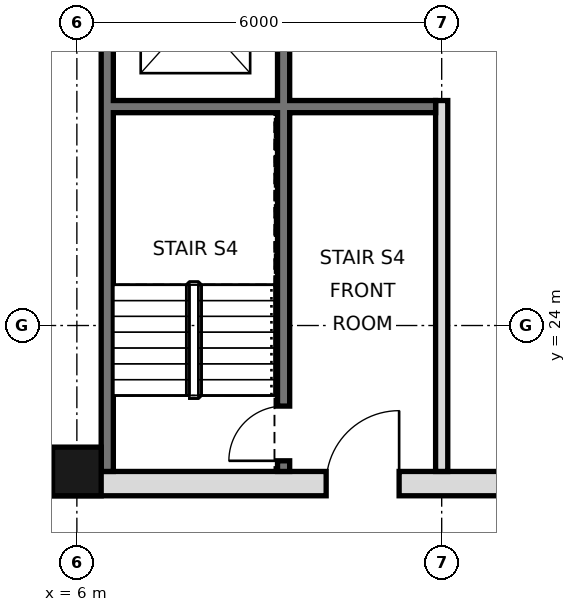
"""IFC4 building model, lengths in metres.
Left out: names, types, materials, properties, quantities, classifications, styles, units other than length and angle.
Written with IfcOpenShell. Run it as: python <this file> out.ifc"""

import sys

from ifc_helpers import new_model, si_unit, direction, frame, frame_2d, origin, origin_2d, place, context, subcontext, project, spatial, rectangle, hollow_rectangle, extrude, element, fill, save


model = new_model("IFC4")
c1 = context("Model", 3, precision=1e-05, world=origin(), true_north=direction((0.0, 1.0)))
c2 = subcontext(c1, "Body", "Model", "MODEL_VIEW")
j1 = project(units=[si_unit("LENGTHUNIT", "METRE"), si_unit("PLANEANGLEUNIT", "RADIAN")], contexts=[c1])
p1 = place(None, origin())
s1 = spatial("IfcSite", under=j1, at=p1, CompositionType="ELEMENT")
p2 = place(p1, origin())
s2 = spatial("IfcBuilding", under=s1, at=p2, CompositionType="ELEMENT")
p3 = place(p2, frame((0.0, 0.0, 161.8)))
s3 = spatial("IfcBuildingStorey", under=s2, at=p3, CompositionType="ELEMENT", Elevation=161.8)
p4 = place(p3, frame((6.0, 21.6, 0.0), z_axis=(0.0, 0.0, 1.0), x_axis=(1.0, 0.0, 0.0)))
e1 = element("IfcColumn", 1, at=p4, inside=s3, PredefinedType="COLUMN", context=c2, shape_type="SweptSolid", body=[
    extrude(hollow_rectangle(XDim=0.8, YDim=0.8, WallThickness=0.045, at=origin_2d()), origin(), (0.0, 0.0, 1.0), 5.4),
])
p5 = place(p3, frame((6.5, 21.6, 0.0), z_axis=(0.0, 0.0, 1.0), x_axis=(0.0, 1.0, 0.0)))
e2 = element("IfcWall", 2, at=p5, inside=s3, PredefinedType="SOLIDWALL", context=c2, shape_type="SweptSolid", body=[
    extrude(rectangle(XDim=23.5, YDim=0.2, at=frame_2d((11.75, 0.0))), origin(), (0.0, 0.0, 1.0), 5.22),
])
p6 = place(p3, frame((5.6, 21.4, 0.0), z_axis=(0.0, 0.0, 1.0), x_axis=(1.0, 0.0, 0.0)))
e3 = element("IfcWall", 3, at=p6, inside=s3, PredefinedType="SOLIDWALL", context=c2, shape_type="SweptSolid", body=[
    extrude(rectangle(XDim=36.8, YDim=0.4, at=frame_2d((18.4, 0.0))), origin(), (0.0, 0.0, 1.0), 5.22),
])
p7 = place(p6, frame((8.5, 0.0, 0.0)))
e4 = element("IfcOpeningElement", 4, at=p7, cuts=e3, PredefinedType="OPENING", context=c2, shape_type="SweptSolid", body=[
    extrude(rectangle(XDim=1.8, YDim=2.1, at=frame_2d((0.9, 1.05))), frame((0.0, 0.21, 0.0), z_axis=(0.0, -1.0, 0.0), x_axis=(1.0, 0.0, 0.0)), (0.0, 0.0, 1.0), 0.42),
])
p8 = place(p6, frame((17.5, 0.0, 0.0)))
e5 = element("IfcOpeningElement", 5, at=p8, cuts=e3, PredefinedType="OPENING", context=c2, shape_type="SweptSolid", body=[
    extrude(rectangle(XDim=1.8, YDim=2.1, at=frame_2d((0.9, 1.05))), frame((0.0, 0.21, 0.0), z_axis=(0.0, -1.0, 0.0), x_axis=(1.0, 0.0, 0.0)), (0.0, 0.0, 1.0), 0.42),
])
p9 = place(p6, frame((26.5, 0.0, 0.0)))
e6 = element("IfcOpeningElement", 6, at=p9, cuts=e3, PredefinedType="OPENING", context=c2, shape_type="SweptSolid", body=[
    extrude(rectangle(XDim=1.8, YDim=2.1, at=frame_2d((0.9, 1.05))), frame((0.0, 0.21, 0.0), z_axis=(0.0, -1.0, 0.0), x_axis=(1.0, 0.0, 0.0)), (0.0, 0.0, 1.0), 0.42),
])
p10 = place(p6, frame((4.5, 0.0, 0.0)))
e7 = element("IfcOpeningElement", 7, at=p10, cuts=e3, PredefinedType="OPENING", context=c2, shape_type="SweptSolid", body=[
    extrude(rectangle(XDim=1.2, YDim=2.1, at=frame_2d((0.6, 1.05))), frame((0.0, 0.21, 0.0), z_axis=(0.0, -1.0, 0.0), x_axis=(1.0, 0.0, 0.0)), (0.0, 0.0, 1.0), 0.42),
])
p11 = place(p6, frame((31.1, 0.0, 0.0)))
e8 = element("IfcOpeningElement", 8, at=p11, cuts=e3, PredefinedType="OPENING", context=c2, shape_type="SweptSolid", body=[
    extrude(rectangle(XDim=1.2, YDim=2.1, at=frame_2d((0.6, 1.05))), frame((0.0, 0.21, 0.0), z_axis=(0.0, -1.0, 0.0), x_axis=(1.0, 0.0, 0.0)), (0.0, 0.0, 1.0), 0.42),
])
p12 = place(p3, frame((12.0, 21.6, 0.0), z_axis=(0.0, 0.0, 1.0), x_axis=(0.0, 1.0, 0.0)))
e9 = element("IfcWall", 9, at=p12, inside=s3, PredefinedType="PARTITIONING", context=c2, shape_type="SweptSolid", body=[
    extrude(rectangle(XDim=6.1, YDim=0.2, at=frame_2d((3.05, 0.0))), origin(), (0.0, 0.0, 1.0), 5.22),
])
p13 = place(p3, frame((9.4, 21.6, 0.0), z_axis=(0.0, 0.0, 1.0), x_axis=(0.0, 1.0, 0.0)))
e10 = element("IfcWall", 10, at=p13, inside=s3, PredefinedType="SOLIDWALL", context=c2, shape_type="SweptSolid", body=[
    extrude(rectangle(XDim=23.4, YDim=0.2, at=frame_2d((11.7, 0.0))), origin(), (0.0, 0.0, 1.0), 5.22),
])
p14 = place(p13, frame((7.0, 0.0, 0.0)))
e11 = element("IfcOpeningElement", 11, at=p14, cuts=e10, PredefinedType="OPENING", context=c2, shape_type="SweptSolid", body=[
    extrude(rectangle(XDim=1.1, YDim=2.1, at=frame_2d((0.55, 1.05))), frame((0.0, 0.11, 0.0), z_axis=(0.0, -1.0, 0.0), x_axis=(1.0, 0.0, 0.0)), (0.0, 0.0, 1.0), 0.22),
])
p15 = place(p13, frame((10.1, 0.0, 0.0)))
e12 = element("IfcOpeningElement", 12, at=p15, cuts=e10, PredefinedType="OPENING", context=c2, shape_type="SweptSolid", body=[
    extrude(rectangle(XDim=1.1, YDim=2.1, at=frame_2d((0.55, 1.05))), frame((0.0, 0.11, 0.0), z_axis=(0.0, -1.0, 0.0), x_axis=(1.0, 0.0, 0.0)), (0.0, 0.0, 1.0), 0.22),
])
p16 = place(p13, frame((13.2, 0.0, 0.0)))
e13 = element("IfcOpeningElement", 13, at=p16, cuts=e10, PredefinedType="OPENING", context=c2, shape_type="SweptSolid", body=[
    extrude(rectangle(XDim=1.1, YDim=2.1, at=frame_2d((0.55, 1.05))), frame((0.0, 0.11, 0.0), z_axis=(0.0, -1.0, 0.0), x_axis=(1.0, 0.0, 0.0)), (0.0, 0.0, 1.0), 0.22),
])
p17 = place(p13, frame((15.7, 0.0, 0.0)))
e14 = element("IfcOpeningElement", 14, at=p17, cuts=e10, PredefinedType="OPENING", context=c2, shape_type="SweptSolid", body=[
    extrude(rectangle(XDim=1.0, YDim=2.1, at=frame_2d((0.5, 1.05))), frame((0.0, 0.11, 0.0), z_axis=(0.0, -1.0, 0.0), x_axis=(1.0, 0.0, 0.0)), (0.0, 0.0, 1.0), 0.22),
])
p18 = place(p13, frame((0.175, 0.0, 0.0)))
e15 = element("IfcOpeningElement", 15, at=p18, cuts=e10, PredefinedType="OPENING", context=c2, shape_type="SweptSolid", body=[
    extrude(rectangle(XDim=0.9, YDim=2.1, at=frame_2d((0.45, 1.05))), frame((0.0, 0.11, 0.0), z_axis=(0.0, -1.0, 0.0), x_axis=(1.0, 0.0, 0.0)), (0.0, 0.0, 1.0), 0.22),
])
p19 = place(p3, frame((6.6, 27.6, 0.0), z_axis=(0.0, 0.0, 1.0), x_axis=(1.0, 0.0, 0.0)))
e16 = element("IfcWall", 16, at=p19, inside=s3, PredefinedType="SOLIDWALL", context=c2, shape_type="SweptSolid", body=[
    extrude(rectangle(XDim=5.3, YDim=0.2, at=frame_2d((2.65, 0.0))), origin(), (0.0, 0.0, 1.0), 5.22),
])
p20 = place(p10, frame((1.2, 0.0, 0.0), z_axis=(0.0, 0.0, 1.0), x_axis=(-1.0, 0.0, 0.0)))
e17 = element("IfcDoor", 17, at=p20, inside=s3, OperationType="SINGLE_SWING_LEFT", PredefinedType="DOOR", context=c2, shape_type="SweptSolid", body=[
    extrude(rectangle(XDim=1.2, YDim=2.1, at=frame_2d((0.6, 1.05))), frame((0.0, 0.025, 0.0), z_axis=(0.0, -1.0, 0.0), x_axis=(1.0, 0.0, 0.0)), (0.0, 0.0, 1.0), 0.05),
])
fill(e7, e17)
p21 = place(p18, origin())
e18 = element("IfcDoor", 18, at=p21, inside=s3, OperationType="SINGLE_SWING_LEFT", PredefinedType="DOOR", context=c2, shape_type="SweptSolid", body=[
    extrude(rectangle(XDim=0.9, YDim=2.1, at=frame_2d((0.45, 1.05))), frame((0.0, 0.025, 0.0), z_axis=(0.0, -1.0, 0.0), x_axis=(1.0, 0.0, 0.0)), (0.0, 0.0, 1.0), 0.05),
])
fill(e15, e18)
save(model, sys.argv[1])
